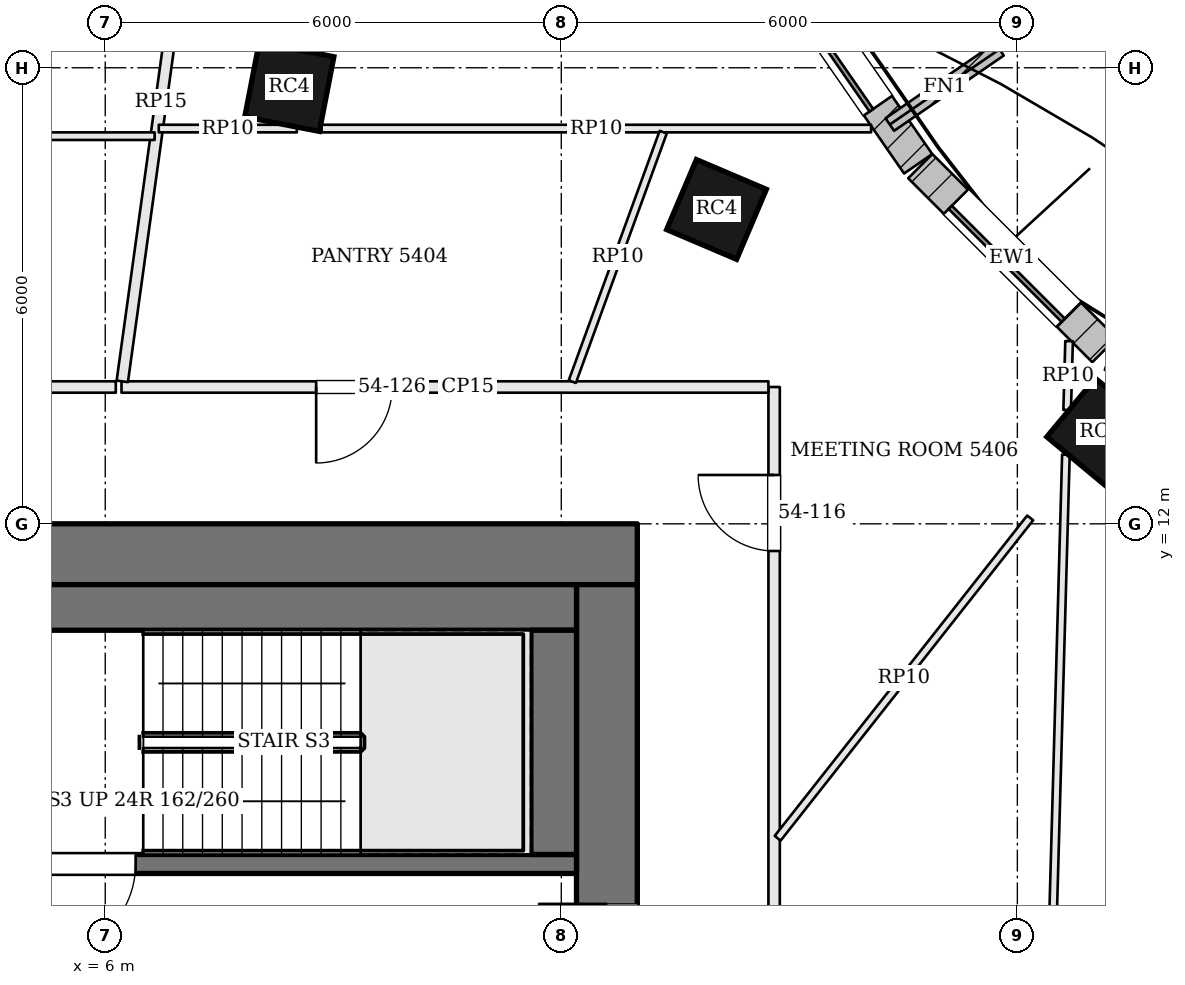
"""IFC4 building model, lengths in metres.
Left out: names, types, materials, properties, quantities, classifications, styles, units other than length and angle.
Written with IfcOpenShell. Run it as: python <this file> out.ifc"""

import sys

from ifc_helpers import new_model, si_unit, direction, frame, frame_2d, origin, origin_2d, place, context, subcontext, project, spatial, rectangle, extrude, element, fill, save


model = new_model("IFC4")
c1 = context("Model", 3, precision=1e-05, world=origin(), true_north=direction((0.0, 1.0)))
c2 = subcontext(c1, "Body", "Model", "MODEL_VIEW")
j1 = project(units=[si_unit("LENGTHUNIT", "METRE"), si_unit("PLANEANGLEUNIT", "RADIAN")], contexts=[c1])
p1 = place(None, origin())
s1 = spatial("IfcSite", under=j1, at=p1, CompositionType="ELEMENT")
p2 = place(p1, origin())
s2 = spatial("IfcBuilding", under=s1, at=p2, CompositionType="ELEMENT")
p3 = place(p2, frame((0.0, 0.0, 221.4)))
s3 = spatial("IfcBuildingStorey", under=s2, at=p3, CompositionType="ELEMENT", Elevation=221.4)
p4 = place(p3, frame((-13.0, 11.6, 0.0), z_axis=(0.0, 0.0, 1.0), x_axis=(1.0, 0.0, 0.0)))
e1 = element("IfcWall", 1, at=p4, inside=s3, PredefinedType="SHEAR", context=c2, shape_type="SweptSolid", body=[
    extrude(rectangle(XDim=26.0, YDim=0.8, at=frame_2d((13.0, 0.0))), origin(), (0.0, 0.0, 1.0), 3.9),
])
p5 = place(p4, frame((9.65, 0.0, 0.0)))
e2 = element("IfcOpeningElement", 2, at=p5, cuts=e1, PredefinedType="OPENING", context=c2, shape_type="SweptSolid", body=[
    extrude(rectangle(XDim=1.0, YDim=2.1, at=frame_2d((0.5, 1.05))), frame((0.0, 0.41, 0.0), z_axis=(0.0, -1.0, 0.0), x_axis=(1.0, 0.0, 0.0)), (0.0, 0.0, 1.0), 0.82),
])
p6 = place(p4, frame((12.675, 0.0, 0.0)))
e3 = element("IfcOpeningElement", 3, at=p6, cuts=e1, PredefinedType="OPENING", context=c2, shape_type="SweptSolid", body=[
    extrude(rectangle(XDim=0.7, YDim=2.1, at=frame_2d((0.35, 1.05))), frame((0.0, 0.41, 0.0), z_axis=(0.0, -1.0, 0.0), x_axis=(1.0, 0.0, 0.0)), (0.0, 0.0, 1.0), 0.82),
])
p7 = place(p4, frame((14.725, 0.0, 0.0)))
e4 = element("IfcOpeningElement", 4, at=p7, cuts=e1, PredefinedType="OPENING", context=c2, shape_type="SweptSolid", body=[
    extrude(rectangle(XDim=0.7, YDim=2.1, at=frame_2d((0.35, 1.05))), frame((0.0, 0.41, 0.0), z_axis=(0.0, -1.0, 0.0), x_axis=(1.0, 0.0, 0.0)), (0.0, 0.0, 1.0), 0.82),
])
p8 = place(p4, frame((16.6, 0.0, 0.0)))
e5 = element("IfcOpeningElement", 5, at=p8, cuts=e1, PredefinedType="OPENING", context=c2, shape_type="SweptSolid", body=[
    extrude(rectangle(XDim=1.0, YDim=2.1, at=frame_2d((0.5, 1.05))), frame((0.0, 0.41, 0.0), z_axis=(0.0, -1.0, 0.0), x_axis=(1.0, 0.0, 0.0)), (0.0, 0.0, 1.0), 0.82),
])
p9 = place(p3, frame((12.6, -2.2, 0.0), z_axis=(0.0, 0.0, 1.0), x_axis=(0.0, 1.0, 0.0)))
e6 = element("IfcWall", 6, at=p9, inside=s3, PredefinedType="SHEAR", context=c2, shape_type="SweptSolid", body=[
    extrude(rectangle(XDim=13.4, YDim=0.8, at=frame_2d((6.7, 0.0))), origin(), (0.0, 0.0, 1.0), 3.9),
])
p10 = place(p9, frame((7.4, 0.0, 0.0)))
e7 = element("IfcOpeningElement", 7, at=p10, cuts=e6, PredefinedType="OPENING", context=c2, shape_type="SweptSolid", body=[
    extrude(rectangle(XDim=1.8, YDim=2.1, at=frame_2d((0.9, 1.05))), frame((0.0, 0.41, 0.0), z_axis=(0.0, -1.0, 0.0), x_axis=(1.0, 0.0, 0.0)), (0.0, 0.0, 1.0), 0.82),
])
for number, where, z_axis, x_axis in (
    (8, (19.092, 13.209, 0.0), (0.0, 0.0, 1.0), (-0.769, 0.639, 0.0)),
    (9, (14.042, 16.136, 0.0), (0.0, 0.0, 1.0), (-0.92, 0.392, 0.0)),
    (10, (8.422, 17.749, 0.0), (0.0, 0.0, 1.0), (-0.982, 0.191, 0.0)),
):
    element("IfcColumn", number, at=place(p3, frame(where, z_axis=z_axis, x_axis=x_axis)), inside=s3, PredefinedType="COLUMN", context=c2, shape_type="SweptSolid", body=[
        extrude(rectangle(XDim=1.0, YDim=1.0, at=origin_2d()), origin(), (0.0, 0.0, 1.0), 3.9),
    ])
p11 = place(p3, frame((19.145, 14.285, 0.0), z_axis=(0.0, 0.0, 1.0), x_axis=(-0.707427521052, 0.706785895769, 0.0)))
e11 = element("IfcWall", 11, at=p11, inside=s3, PredefinedType="SOLIDWALL", context=c2, shape_type="SweptSolid", body=[
    extrude(rectangle(XDim=3.425, YDim=0.45, at=frame_2d((1.712, 0.0))), origin(), (0.0, 0.0, 1.0), 3.7),
])
p12 = place(p11, frame((0.662, 0.0, 0.9)))
e12 = element("IfcOpeningElement", 12, at=p12, cuts=e11, PredefinedType="OPENING", context=c2, shape_type="SweptSolid", body=[
    extrude(rectangle(XDim=2.1, YDim=2.3, at=frame_2d((1.05, 1.15))), frame((0.0, 0.235, 0.0), z_axis=(0.0, -1.0, 0.0), x_axis=(1.0, 0.0, 0.0)), (0.0, 0.0, 1.0), 0.47),
])
p13 = place(p3, frame((16.695, 16.737, 0.0), z_axis=(0.0, 0.0, 1.0), x_axis=(-0.569652445465, 0.821885692402, 0.0)))
e13 = element("IfcWall", 13, at=p13, inside=s3, PredefinedType="SOLIDWALL", context=c2, shape_type="SweptSolid", body=[
    extrude(rectangle(XDim=3.959, YDim=0.45, at=frame_2d((1.979, 0.0))), origin(), (0.0, 0.0, 1.0), 3.7),
])
p14 = place(p13, frame((0.929, 0.0, 0.9)))
e14 = element("IfcOpeningElement", 14, at=p14, cuts=e13, PredefinedType="OPENING", context=c2, shape_type="SweptSolid", body=[
    extrude(rectangle(XDim=2.1, YDim=2.3, at=frame_2d((1.05, 1.15))), frame((0.0, 0.235, 0.0), z_axis=(0.0, -1.0, 0.0), x_axis=(1.0, 0.0, 0.0)), (0.0, 0.0, 1.0), 0.47),
])
p15 = place(p3, frame((16.322, 17.253, 0.0), z_axis=(0.0, 0.0, 1.0), x_axis=(0.824440606412, 0.565948483962, 0.0)))
e15 = element("IfcWall", 15, at=p15, inside=s3, PredefinedType="SOLIDWALL", context=c2, shape_type="SweptSolid", body=[
    extrude(rectangle(XDim=1.75, YDim=0.2, at=frame_2d((0.875, 0.0))), origin(), (0.0, 0.0, 1.0), 3.7),
])
p16 = place(p3, frame((12.2, 7.525, 0.0), z_axis=(0.0, 0.0, 1.0), x_axis=(-1.0, 0.0, 0.0)))
e16 = element("IfcWall", 16, at=p16, inside=s3, PredefinedType="SOLIDWALL", context=c2, shape_type="SweptSolid", body=[
    extrude(rectangle(XDim=7.1, YDim=0.25, at=frame_2d((3.55, 0.0))), origin(), (0.0, 0.0, 1.0), 3.7),
])
p17 = place(p16, frame((5.8, 0.0, 0.0)))
e17 = element("IfcOpeningElement", 17, at=p17, cuts=e16, PredefinedType="OPENING", context=c2, shape_type="SweptSolid", body=[
    extrude(rectangle(XDim=1.2, YDim=2.1, at=frame_2d((0.6, 1.05))), frame((0.0, 0.135, 0.0), z_axis=(0.0, -1.0, 0.0), x_axis=(1.0, 0.0, 0.0)), (0.0, 0.0, 1.0), 0.27),
])
p18 = place(p3, frame((12.2, 10.9, 0.0), z_axis=(0.0, 0.0, 1.0), x_axis=(-1.0, 0.0, 0.0)))
e18 = element("IfcWall", 18, at=p18, inside=s3, PredefinedType="SOLIDWALL", context=c2, shape_type="SweptSolid", body=[
    extrude(rectangle(XDim=7.1, YDim=0.6, at=frame_2d((3.55, 0.0))), origin(), (0.0, 0.0, 1.0), 3.7),
])
p19 = place(p3, frame((11.9, 10.6, 0.0), z_axis=(0.0, 0.0, 1.0), x_axis=(0.0, -1.0, 0.0)))
e19 = element("IfcWall", 19, at=p19, inside=s3, PredefinedType="SOLIDWALL", context=c2, shape_type="SweptSolid", body=[
    extrude(rectangle(XDim=2.95, YDim=0.6, at=frame_2d((1.475, 0.0))), origin(), (0.0, 0.0, 1.0), 3.7),
])
p20 = place(p3, frame((14.8, -2.15, 0.0), z_axis=(0.0, 0.0, 1.0), x_axis=(0.0, 1.0, 0.0)))
e20 = element("IfcWall", 20, at=p20, inside=s3, PredefinedType="PARTITIONING", context=c2, shape_type="SweptSolid", body=[
    extrude(rectangle(XDim=15.95, YDim=0.15, at=frame_2d((7.975, 0.0))), origin(), (0.0, 0.0, 1.0), 3.084),
])
p21 = place(p20, frame((4.04, 0.0, 0.0)))
e21 = element("IfcOpeningElement", 21, at=p21, cuts=e20, PredefinedType="OPENING", context=c2, shape_type="SweptSolid", body=[
    extrude(rectangle(XDim=1.8, YDim=2.1, at=frame_2d((0.9, 1.05))), frame((0.0, 0.085, 0.0), z_axis=(0.0, -1.0, 0.0), x_axis=(1.0, 0.0, 0.0)), (0.0, 0.0, 1.0), 0.17),
])
p22 = place(p20, frame((13.793, 0.0, 0.0)))
e22 = element("IfcOpeningElement", 22, at=p22, cuts=e20, PredefinedType="OPENING", context=c2, shape_type="SweptSolid", body=[
    extrude(rectangle(XDim=1.0, YDim=2.4, at=frame_2d((0.5, 1.2))), frame((0.0, 0.085, 0.0), z_axis=(0.0, -1.0, 0.0), x_axis=(1.0, 0.0, 0.0)), (0.0, 0.0, 1.0), 0.17),
])
p23 = place(p3, frame((14.725, 13.8, 0.0), z_axis=(0.0, 0.0, 1.0), x_axis=(-1.0, 0.0, 0.0)))
e23 = element("IfcWall", 23, at=p23, inside=s3, PredefinedType="PARTITIONING", context=c2, shape_type="SweptSolid", body=[
    extrude(rectangle(XDim=8.511, YDim=0.15, at=frame_2d((4.255, 0.0))), origin(), (0.0, 0.0, 1.0), 3.084),
])
p24 = place(p23, frame((4.95, 0.0, 0.0)))
e24 = element("IfcOpeningElement", 24, at=p24, cuts=e23, PredefinedType="OPENING", context=c2, shape_type="SweptSolid", body=[
    extrude(rectangle(XDim=1.0, YDim=2.1, at=frame_2d((0.5, 1.05))), frame((0.0, 0.085, 0.0), z_axis=(0.0, -1.0, 0.0), x_axis=(1.0, 0.0, 0.0)), (0.0, 0.0, 1.0), 0.17),
])
p25 = place(p3, frame((7.242, 21.233, 0.0), z_axis=(0.0, 0.0, 1.0), x_axis=(-0.136979917761, -0.990573824674, 0.0)))
e25 = element("IfcWall", 25, at=p25, inside=s3, PredefinedType="PARTITIONING", context=c2, shape_type="SweptSolid", body=[
    extrude(rectangle(XDim=7.429, YDim=0.15, at=frame_2d((3.714, 0.0))), origin(), (0.0, 0.0, 1.0), 3.234),
])
p26 = place(p3, frame((6.139, 13.8, 0.0), z_axis=(0.0, 0.0, 1.0), x_axis=(-1.0, 0.0, 0.0)))
e26 = element("IfcWall", 26, at=p26, inside=s3, PredefinedType="PARTITIONING", context=c2, shape_type="SweptSolid", body=[
    extrude(rectangle(XDim=12.308, YDim=0.15, at=frame_2d((6.154, 0.0))), origin(), (0.0, 0.0, 1.0), 3.084),
])
p27 = place(p26, frame((2.238, 0.0, 0.0)))
e27 = element("IfcOpeningElement", 27, at=p27, cuts=e26, PredefinedType="OPENING", context=c2, shape_type="SweptSolid", body=[
    extrude(rectangle(XDim=1.8, YDim=2.1, at=frame_2d((0.9, 1.05))), frame((0.0, 0.085, 0.0), z_axis=(0.0, -1.0, 0.0), x_axis=(1.0, 0.0, 0.0)), (0.0, 0.0, 1.0), 0.17),
])
p28 = place(p26, frame((7.325, 0.0, 0.0)))
e28 = element("IfcOpeningElement", 28, at=p28, cuts=e26, PredefinedType="OPENING", context=c2, shape_type="SweptSolid", body=[
    extrude(rectangle(XDim=1.0, YDim=2.4, at=frame_2d((0.5, 1.2))), frame((0.0, 0.085, 0.0), z_axis=(0.0, -1.0, 0.0), x_axis=(1.0, 0.0, 0.0)), (0.0, 0.0, 1.0), 0.17),
])
p29 = place(p3, frame((6.704, 17.2, 0.0), z_axis=(0.0, 0.0, 1.0), x_axis=(1.0, 0.0, 0.0)))
e29 = element("IfcWall", 29, at=p29, inside=s3, PredefinedType="PARTITIONING", context=c2, shape_type="SweptSolid", body=[
    extrude(rectangle(XDim=1.817, YDim=0.1, at=frame_2d((0.908, 0.0))), origin(), (0.0, 0.0, 1.0), 3.084),
])
p30 = place(p3, frame((8.845, 17.2, 0.0), z_axis=(0.0, 0.0, 1.0), x_axis=(1.0, 0.0, 0.0)))
e30 = element("IfcWall", 30, at=p30, inside=s3, PredefinedType="PARTITIONING", context=c2, shape_type="SweptSolid", body=[
    extrude(rectangle(XDim=7.231, YDim=0.1, at=frame_2d((3.615, 0.0))), origin(), (0.0, 0.0, 1.0), 3.084),
])
p31 = place(p3, frame((18.681, 14.404, 0.0), z_axis=(0.0, 0.0, 1.0), x_axis=(-0.027737168864, -0.999615250716, 0.0)))
e31 = element("IfcWall", 31, at=p31, inside=s3, PredefinedType="PARTITIONING", context=c2, shape_type="SweptSolid", body=[
    extrude(rectangle(XDim=0.906, YDim=0.1, at=frame_2d((0.453, 0.0))), origin(), (0.0, 0.0, 1.0), 3.084),
])
p32 = place(p3, frame((18.639, 12.909, 0.0), z_axis=(0.0, 0.0, 1.0), x_axis=(-0.027844870204, -0.999612256429, 0.0)))
e32 = element("IfcWall", 32, at=p32, inside=s3, PredefinedType="PARTITIONING", context=c2, shape_type="SweptSolid", body=[
    extrude(rectangle(XDim=15.765, YDim=0.1, at=frame_2d((7.882, 0.0))), origin(), (0.0, 0.0, 1.0), 3.084),
])
p33 = place(p32, frame((9.403, 0.0, 0.0)))
e33 = element("IfcOpeningElement", 33, at=p33, cuts=e32, PredefinedType="OPENING", context=c2, shape_type="SweptSolid", body=[
    extrude(rectangle(XDim=1.0, YDim=2.1, at=frame_2d((0.5, 1.05))), frame((0.0, 0.06, 0.0), z_axis=(0.0, -1.0, 0.0), x_axis=(1.0, 0.0, 0.0)), (0.0, 0.0, 1.0), 0.12),
])
p34 = place(p3, frame((14.846, 7.863, 0.0), z_axis=(0.0, 0.0, 1.0), x_axis=(0.619070377388, 0.785335512912, 0.0)))
e34 = element("IfcWall", 34, at=p34, inside=s3, PredefinedType="PARTITIONING", context=c2, shape_type="SweptSolid", body=[
    extrude(rectangle(XDim=5.367, YDim=0.1, at=frame_2d((2.684, 0.0))), origin(), (0.0, 0.0, 1.0), 3.084),
])
p35 = place(p3, frame((12.145, 13.871, 0.0), z_axis=(0.0, 0.0, 1.0), x_axis=(0.34223119797, 0.939615776334, 0.0)))
e35 = element("IfcWall", 35, at=p35, inside=s3, PredefinedType="PARTITIONING", context=c2, shape_type="SweptSolid", body=[
    extrude(rectangle(XDim=3.493, YDim=0.1, at=frame_2d((1.747, 0.0))), origin(), (0.0, 0.0, 1.0), 3.084),
])
p36 = place(p3, frame((-6.684, 17.1, 0.0), z_axis=(0.0, 0.0, 1.0), x_axis=(1.0, 0.0, 0.0)))
e36 = element("IfcWall", 36, at=p36, inside=s3, PredefinedType="PARTITIONING", context=c2, shape_type="SweptSolid", body=[
    extrude(rectangle(XDim=13.334, YDim=0.1, at=frame_2d((6.667, 0.0))), origin(), (0.0, 0.0, 1.0), 3.084),
])
p37 = place(p36, frame((10.15, 0.0, 0.0)))
e37 = element("IfcOpeningElement", 37, at=p37, cuts=e36, PredefinedType="OPENING", context=c2, shape_type="SweptSolid", body=[
    extrude(rectangle(XDim=1.0, YDim=2.1, at=frame_2d((0.5, 1.05))), frame((0.0, 0.06, 0.0), z_axis=(0.0, -1.0, 0.0), x_axis=(1.0, 0.0, 0.0)), (0.0, 0.0, 1.0), 0.12),
])
p38 = place(p36, frame((0.863, 0.0, 0.0)))
e38 = element("IfcOpeningElement", 38, at=p38, cuts=e36, PredefinedType="OPENING", context=c2, shape_type="SweptSolid", body=[
    extrude(rectangle(XDim=0.9, YDim=2.1, at=frame_2d((0.45, 1.05))), frame((0.0, 0.06, 0.0), z_axis=(0.0, -1.0, 0.0), x_axis=(1.0, 0.0, 0.0)), (0.0, 0.0, 1.0), 0.12),
])
p39 = place(p12, origin())
e39 = element("IfcWindow", 39, at=p39, inside=s3, PartitioningType="SINGLE_PANEL", PredefinedType="WINDOW", context=c2, shape_type="SweptSolid", body=[
    extrude(rectangle(XDim=2.1, YDim=2.3, at=frame_2d((1.05, 1.15))), frame((0.0, 0.135, 0.0), z_axis=(0.0, -1.0, 0.0), x_axis=(1.0, 0.0, 0.0)), (0.0, 0.0, 1.0), 0.06),
])
fill(e12, e39)
p40 = place(p14, origin())
e40 = element("IfcWindow", 40, at=p40, inside=s3, PartitioningType="SINGLE_PANEL", PredefinedType="WINDOW", context=c2, shape_type="SweptSolid", body=[
    extrude(rectangle(XDim=2.1, YDim=2.3, at=frame_2d((1.05, 1.15))), frame((0.0, 0.135, 0.0), z_axis=(0.0, -1.0, 0.0), x_axis=(1.0, 0.0, 0.0)), (0.0, 0.0, 1.0), 0.06),
])
fill(e14, e40)
p41 = place(p10, origin())
e41 = element("IfcDoor", 41, at=p41, inside=s3, OperationType="DOUBLE_DOOR_SINGLE_SWING", PredefinedType="DOOR", context=c2, shape_type="SweptSolid", body=[
    extrude(rectangle(XDim=1.8, YDim=2.1, at=frame_2d((0.9, 1.05))), frame((0.0, 0.025, 0.0), z_axis=(0.0, -1.0, 0.0), x_axis=(1.0, 0.0, 0.0)), (0.0, 0.0, 1.0), 0.05),
])
fill(e7, e41)
p42 = place(p17, origin())
e42 = element("IfcDoor", 42, at=p42, inside=s3, OperationType="SINGLE_SWING_RIGHT", PredefinedType="DOOR", context=c2, shape_type="SweptSolid", body=[
    extrude(rectangle(XDim=1.2, YDim=2.1, at=frame_2d((0.6, 1.05))), frame((0.0, 0.025, 0.0), z_axis=(0.0, -1.0, 0.0), x_axis=(1.0, 0.0, 0.0)), (0.0, 0.0, 1.0), 0.05),
])
fill(e17, e42)
p43 = place(p22, origin())
e43 = element("IfcDoor", 43, at=p43, inside=s3, OperationType="SINGLE_SWING_RIGHT", PredefinedType="DOOR", context=c2, shape_type="SweptSolid", body=[
    extrude(rectangle(XDim=1.0, YDim=2.4, at=frame_2d((0.5, 1.2))), frame((0.0, 0.025, 0.0), z_axis=(0.0, -1.0, 0.0), x_axis=(1.0, 0.0, 0.0)), (0.0, 0.0, 1.0), 0.05),
])
fill(e22, e43)
p44 = place(p24, origin())
e44 = element("IfcDoor", 44, at=p44, inside=s3, OperationType="SINGLE_SWING_RIGHT", PredefinedType="DOOR", context=c2, shape_type="SweptSolid", body=[
    extrude(rectangle(XDim=1.0, YDim=2.1, at=frame_2d((0.5, 1.05))), frame((0.0, 0.025, 0.0), z_axis=(0.0, -1.0, 0.0), x_axis=(1.0, 0.0, 0.0)), (0.0, 0.0, 1.0), 0.05),
])
fill(e24, e44)
save(model, sys.argv[1])
